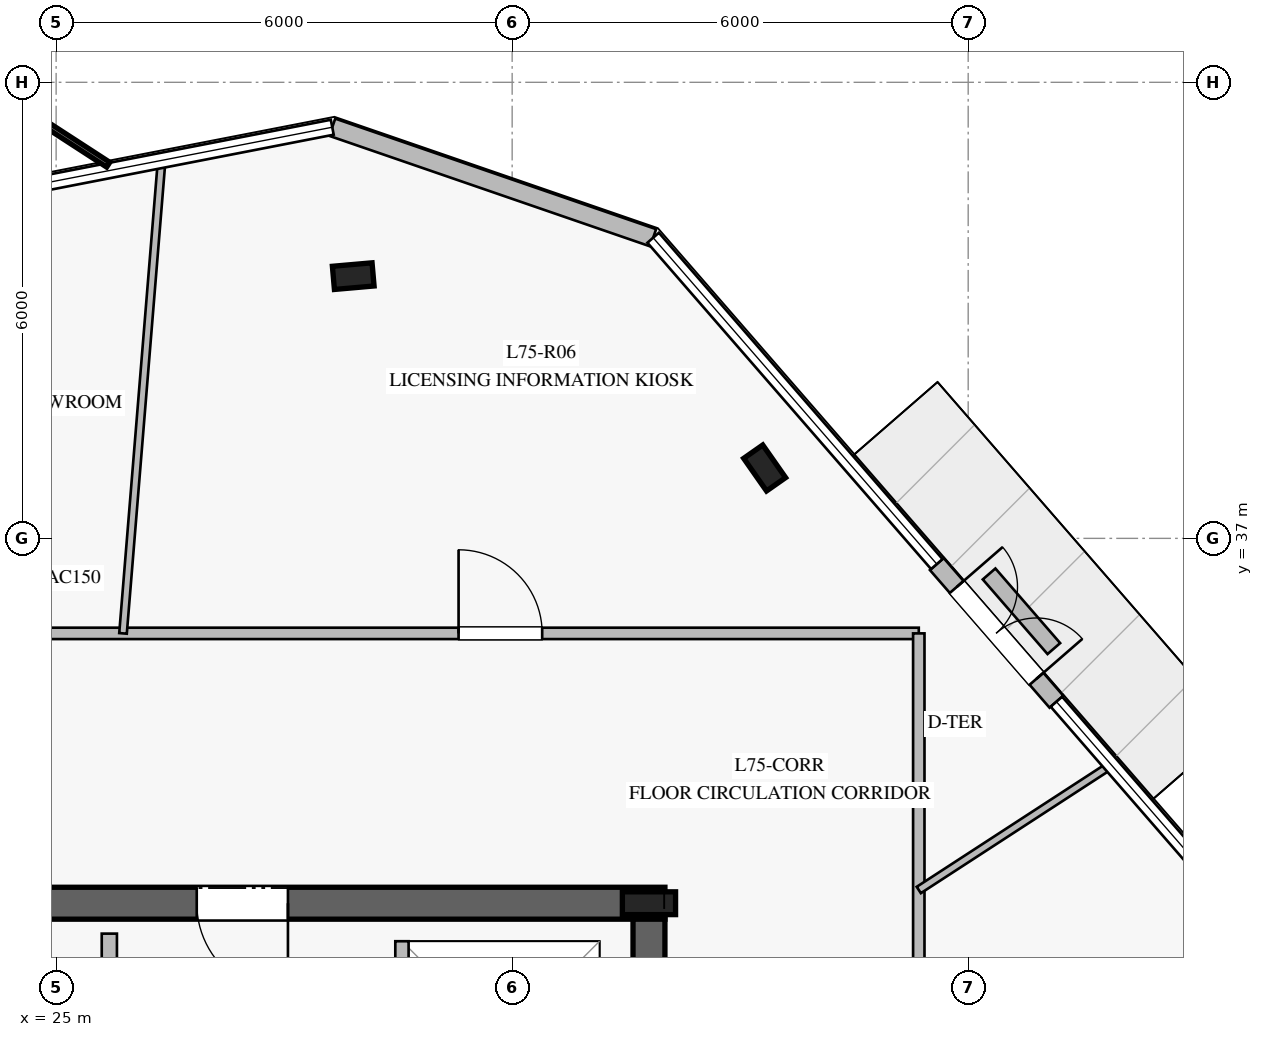
"""IFC4 building model, lengths in metres.
Left out: names, types, materials, properties, quantities, classifications, styles, units other than length and angle.
Written with IfcOpenShell. Run it as: python <this file> out.ifc"""

import sys

from ifc_helpers import new_model, si_unit, direction, frame, frame_2d, origin, origin_2d, place, context, subcontext, project, spatial, rectangle, i_section, extrude, element, fill, save


model = new_model("IFC4")
c1 = context("Model", 3, precision=1e-05, world=origin(), true_north=direction((0.0, 1.0)))
c2 = subcontext(c1, "Body", "Model", "MODEL_VIEW")
j1 = project(units=[si_unit("LENGTHUNIT", "METRE"), si_unit("PLANEANGLEUNIT", "RADIAN")], contexts=[c1])
p1 = place(None, origin())
s1 = spatial("IfcSite", under=j1, at=p1, CompositionType="ELEMENT")
p2 = place(p1, origin())
s2 = spatial("IfcBuilding", under=s1, at=p2, CompositionType="ELEMENT")
p3 = place(p2, frame((0.0, 0.0, 310.2)))
s3 = spatial("IfcBuildingStorey", under=s2, at=p3, CompositionType="ELEMENT", Elevation=310.2)
p4 = place(p3, frame((33.01, 32.2, 0.0), z_axis=(0.0, 0.0, 1.0), x_axis=(-1.0, 0.0, 0.0)))
e1 = element("IfcWall", 1, at=p4, inside=s3, PredefinedType="SHEAR", context=c2, shape_type="SweptSolid", body=[
    extrude(rectangle(XDim=16.02, YDim=0.42, at=frame_2d((8.01, 0.0))), origin(), (0.0, 0.0, 1.0), 3.78),
])
p5 = place(p4, frame((4.96, 0.0, 0.0)))
e2 = element("IfcOpeningElement", 2, at=p5, cuts=e1, PredefinedType="OPENING", context=c2, shape_type="SweptSolid", body=[
    extrude(rectangle(XDim=1.2, YDim=2.25, at=frame_2d((0.6, 1.125))), frame((0.0, 0.22, 0.0), z_axis=(0.0, -1.0, 0.0), x_axis=(1.0, 0.0, 0.0)), (0.0, 0.0, 1.0), 0.44),
])
p6 = place(p4, frame((9.785, 0.0, 0.0)))
e3 = element("IfcOpeningElement", 3, at=p6, cuts=e1, PredefinedType="OPENING", context=c2, shape_type="SweptSolid", body=[
    extrude(rectangle(XDim=1.1, YDim=2.2, at=frame_2d((0.55, 1.1))), frame((0.0, 0.22, 0.0), z_axis=(0.0, -1.0, 0.0), x_axis=(1.0, 0.0, 0.0)), (0.0, 0.0, 1.0), 0.44),
])
p7 = place(p3, frame((32.8, 18.01, 0.0), z_axis=(0.0, 0.0, 1.0), x_axis=(0.0, 1.0, 0.0)))
e4 = element("IfcWall", 4, at=p7, inside=s3, PredefinedType="SHEAR", context=c2, shape_type="SweptSolid", body=[
    extrude(rectangle(XDim=13.98, YDim=0.42, at=frame_2d((6.99, 0.0))), origin(), (0.0, 0.0, 1.0), 3.78),
])
p8 = place(p3, frame((32.8, 32.2, 0.0), z_axis=(0.0, 0.0, 1.0), x_axis=(1.0, 0.0, 0.0)))
e5 = element("IfcColumn", 5, at=p8, inside=s3, PredefinedType="COLUMN", context=c2, shape_type="SweptSolid", body=[
    extrude(i_section(OverallWidth=0.3, OverallDepth=0.7, WebThickness=0.017, FlangeThickness=0.032, at=origin_2d()), origin(), (0.0, 0.0, 1.0), 4.0),
])
for number, where, z_axis, x_axis in (
    (6, (28.909, 40.45, 0.0), (0.0, 0.0, 1.0), (0.996, 0.087, 0.0)),
    (7, (34.322, 37.926, 0.0), (0.0, 0.0, 1.0), (-0.574, 0.819, 0.0)),
):
    element("IfcColumn", number, at=place(p3, frame(where, z_axis=z_axis, x_axis=x_axis)), inside=s3, PredefinedType="COLUMN", context=c2, shape_type="SweptSolid", body=[
        extrude(i_section(OverallWidth=0.306, OverallDepth=0.524, WebThickness=0.021, FlangeThickness=0.04, at=origin_2d()), origin(), (0.0, 0.0, 1.0), 4.0),
    ])
p9 = place(p3, frame((38.161, 34.851, 0.0), z_axis=(0.0, 0.0, 1.0), x_axis=(-0.655979683466, 0.754778546913, 0.0)))
e8 = element("IfcWall", 8, at=p9, inside=s3, PredefinedType="STANDARD", context=c2, shape_type="SweptSolid", body=[
    extrude(rectangle(XDim=2.399, YDim=0.24, at=frame_2d((1.2, 0.0))), origin(), (0.0, 0.0, 1.0), 3.78),
])
p10 = place(p9, frame((0.4, 0.0, 0.0)))
e9 = element("IfcOpeningElement", 9, at=p10, cuts=e8, PredefinedType="OPENING", context=c2, shape_type="SweptSolid", body=[
    extrude(rectangle(XDim=1.6, YDim=2.25, at=frame_2d((0.8, 1.125))), frame((0.0, 0.13, 0.0), z_axis=(0.0, -1.0, 0.0), x_axis=(1.0, 0.0, 0.0)), (0.0, 0.0, 1.0), 0.26),
])
p11 = place(p3, frame((32.855, 40.955, 0.0), z_axis=(0.0, 0.0, 1.0), x_axis=(-0.945509443057, 0.325594676077, 0.0)))
e10 = element("IfcWall", 10, at=p11, inside=s3, PredefinedType="STANDARD", context=c2, shape_type="SweptSolid", body=[
    extrude(rectangle(XDim=4.465, YDim=0.24, at=frame_2d((2.233, 0.0))), origin(), (0.0, 0.0, 1.0), 3.78),
])
p12 = place(p3, frame((38.127, 35.55, 0.0), z_axis=(0.0, 0.0, 1.0), x_axis=(-0.655387978368, 0.755292392263, 0.0)))
e11 = element("IfcWall", 11, at=p12, inside=s3, PredefinedType="USERDEFINED", context=c2, shape_type="SweptSolid", body=[
    extrude(rectangle(XDim=1.3, YDim=0.22, at=frame_2d((0.65, 0.0))), origin(), (0.0, 0.0, 1.0), 0.4),
])
p13 = place(p3, frame((25.7, 26.65, 0.0), z_axis=(0.0, 0.0, 1.0), x_axis=(0.0, 1.0, 0.0)))
e12 = element("IfcWall", 12, at=p13, inside=s3, PredefinedType="PARTITIONING", context=c2, shape_type="SweptSolid", body=[
    extrude(rectangle(XDim=5.15, YDim=0.2, at=frame_2d((2.575, 0.0))), origin(), (0.0, 0.0, 1.0), 3.78),
])
p14 = place(p3, frame((29.55, 29.1, 0.0), z_axis=(0.0, 0.0, 1.0), x_axis=(0.0, 1.0, 0.0)))
e13 = element("IfcWall", 13, at=p14, inside=s3, PredefinedType="PARTITIONING", context=c2, shape_type="SweptSolid", body=[
    extrude(rectangle(XDim=2.6, YDim=0.175, at=frame_2d((1.3, 0.0))), origin(), (0.0, 0.0, 1.0), 3.78),
])
p15 = place(p14, frame((0.7, 0.0, 0.0)))
e14 = element("IfcOpeningElement", 14, at=p15, cuts=e13, PredefinedType="OPENING", context=c2, shape_type="SweptSolid", body=[
    extrude(rectangle(XDim=1.2, YDim=2.2, at=frame_2d((0.6, 1.1))), frame((0.0, 0.098, 0.0), z_axis=(0.0, -1.0, 0.0), x_axis=(1.0, 0.0, 0.0)), (0.0, 0.0, 1.0), 0.195),
])
p16 = place(p3, frame((13.65, 35.75, 0.0), z_axis=(0.0, 0.0, 1.0), x_axis=(1.0, 0.0, 0.0)))
e15 = element("IfcWall", 15, at=p16, inside=s3, PredefinedType="PARTITIONING", context=c2, shape_type="SweptSolid", body=[
    extrude(rectangle(XDim=22.7, YDim=0.15, at=frame_2d((11.35, 0.0))), origin(), (0.0, 0.0, 1.0), 3.28),
])
p17 = place(p16, frame((7.62, 0.0, 0.0)))
e16 = element("IfcOpeningElement", 16, at=p17, cuts=e15, PredefinedType="OPENING", context=c2, shape_type="SweptSolid", body=[
    extrude(rectangle(XDim=1.1, YDim=2.2, at=frame_2d((0.55, 1.1))), frame((0.0, 0.085, 0.0), z_axis=(0.0, -1.0, 0.0), x_axis=(1.0, 0.0, 0.0)), (0.0, 0.0, 1.0), 0.17),
])
p18 = place(p16, frame((16.645, 0.0, 0.0)))
e17 = element("IfcOpeningElement", 17, at=p18, cuts=e15, PredefinedType="OPENING", context=c2, shape_type="SweptSolid", body=[
    extrude(rectangle(XDim=1.1, YDim=2.2, at=frame_2d((0.55, 1.1))), frame((0.0, 0.085, 0.0), z_axis=(0.0, -1.0, 0.0), x_axis=(1.0, 0.0, 0.0)), (0.0, 0.0, 1.0), 0.17),
])
p19 = place(p16, frame((1.773, 0.0, 0.0)))
e18 = element("IfcOpeningElement", 18, at=p19, cuts=e15, PredefinedType="OPENING", context=c2, shape_type="SweptSolid", body=[
    extrude(rectangle(XDim=1.1, YDim=2.2, at=frame_2d((0.55, 1.1))), frame((0.0, 0.085, 0.0), z_axis=(0.0, -1.0, 0.0), x_axis=(1.0, 0.0, 0.0)), (0.0, 0.0, 1.0), 0.17),
])
p20 = place(p3, frame((36.35, 35.75, 0.0), z_axis=(0.0, 0.0, 1.0), x_axis=(0.0, -1.0, 0.0)))
e19 = element("IfcWall", 19, at=p20, inside=s3, PredefinedType="PARTITIONING", context=c2, shape_type="SweptSolid", body=[
    extrude(rectangle(XDim=21.5, YDim=0.15, at=frame_2d((10.75, 0.0))), origin(), (0.0, 0.0, 1.0), 3.28),
])
p21 = place(p20, frame((17.271, 0.0, 0.0)))
e20 = element("IfcOpeningElement", 20, at=p21, cuts=e19, PredefinedType="OPENING", context=c2, shape_type="SweptSolid", body=[
    extrude(rectangle(XDim=1.1, YDim=2.2, at=frame_2d((0.55, 1.1))), frame((0.0, 0.085, 0.0), z_axis=(0.0, -1.0, 0.0), x_axis=(1.0, 0.0, 0.0)), (0.0, 0.0, 1.0), 0.17),
])
p22 = place(p20, frame((8.452, 0.0, 0.0)))
e21 = element("IfcOpeningElement", 21, at=p22, cuts=e19, PredefinedType="OPENING", context=c2, shape_type="SweptSolid", body=[
    extrude(rectangle(XDim=1.1, YDim=2.2, at=frame_2d((0.55, 1.1))), frame((0.0, 0.085, 0.0), z_axis=(0.0, -1.0, 0.0), x_axis=(1.0, 0.0, 0.0)), (0.0, 0.0, 1.0), 0.17),
])
p23 = place(p3, frame((36.35, 32.374, 0.0), z_axis=(0.0, 0.0, 1.0), x_axis=(0.838454751328, 0.544971219401, 0.0)))
e22 = element("IfcWall", 22, at=p23, inside=s3, PredefinedType="MOVABLE", context=c2, shape_type="SweptSolid", body=[
    extrude(rectangle(XDim=3.006, YDim=0.1, at=frame_2d((1.503, 0.0))), origin(), (0.0, 0.0, 1.0), 3.28),
])
p24 = place(p3, frame((25.88, 35.75, 0.0), z_axis=(0.0, 0.0, 1.0), x_axis=(0.081435932635, 0.996678578518, 0.0)))
e23 = element("IfcWall", 23, at=p24, inside=s3, PredefinedType="MOVABLE", context=c2, shape_type="SweptSolid", body=[
    extrude(rectangle(XDim=6.227, YDim=0.1, at=frame_2d((3.113, 0.0))), origin(), (0.0, 0.0, 1.0), 3.28),
])
p25 = place(p10, frame((1.6, 0.0, 0.0), z_axis=(0.0, 0.0, 1.0), x_axis=(-1.0, 0.0, 0.0)))
e24 = element("IfcDoor", 24, at=p25, inside=s3, OperationType="DOUBLE_DOOR_SINGLE_SWING", PredefinedType="DOOR", context=c2, shape_type="SweptSolid", body=[
    extrude(rectangle(XDim=1.6, YDim=2.25, at=frame_2d((0.8, 1.125))), frame((0.0, 0.025, 0.0), z_axis=(0.0, -1.0, 0.0), x_axis=(1.0, 0.0, 0.0)), (0.0, 0.0, 1.0), 0.05),
])
fill(e9, e24)
p26 = place(p5, origin())
e25 = element("IfcDoor", 25, at=p26, inside=s3, OperationType="SINGLE_SWING_LEFT", PredefinedType="DOOR", context=c2, shape_type="SweptSolid", body=[
    extrude(rectangle(XDim=1.2, YDim=2.25, at=frame_2d((0.6, 1.125))), frame((0.0, 0.025, 0.0), z_axis=(0.0, -1.0, 0.0), x_axis=(1.0, 0.0, 0.0)), (0.0, 0.0, 1.0), 0.05),
])
fill(e2, e25)
p27 = place(p18, origin())
e26 = element("IfcDoor", 26, at=p27, inside=s3, OperationType="SINGLE_SWING_LEFT", PredefinedType="DOOR", context=c2, shape_type="SweptSolid", body=[
    extrude(rectangle(XDim=1.1, YDim=2.2, at=frame_2d((0.55, 1.1))), frame((0.0, 0.025, 0.0), z_axis=(0.0, -1.0, 0.0), x_axis=(1.0, 0.0, 0.0)), (0.0, 0.0, 1.0), 0.05),
])
fill(e17, e26)
save(model, sys.argv[1])
